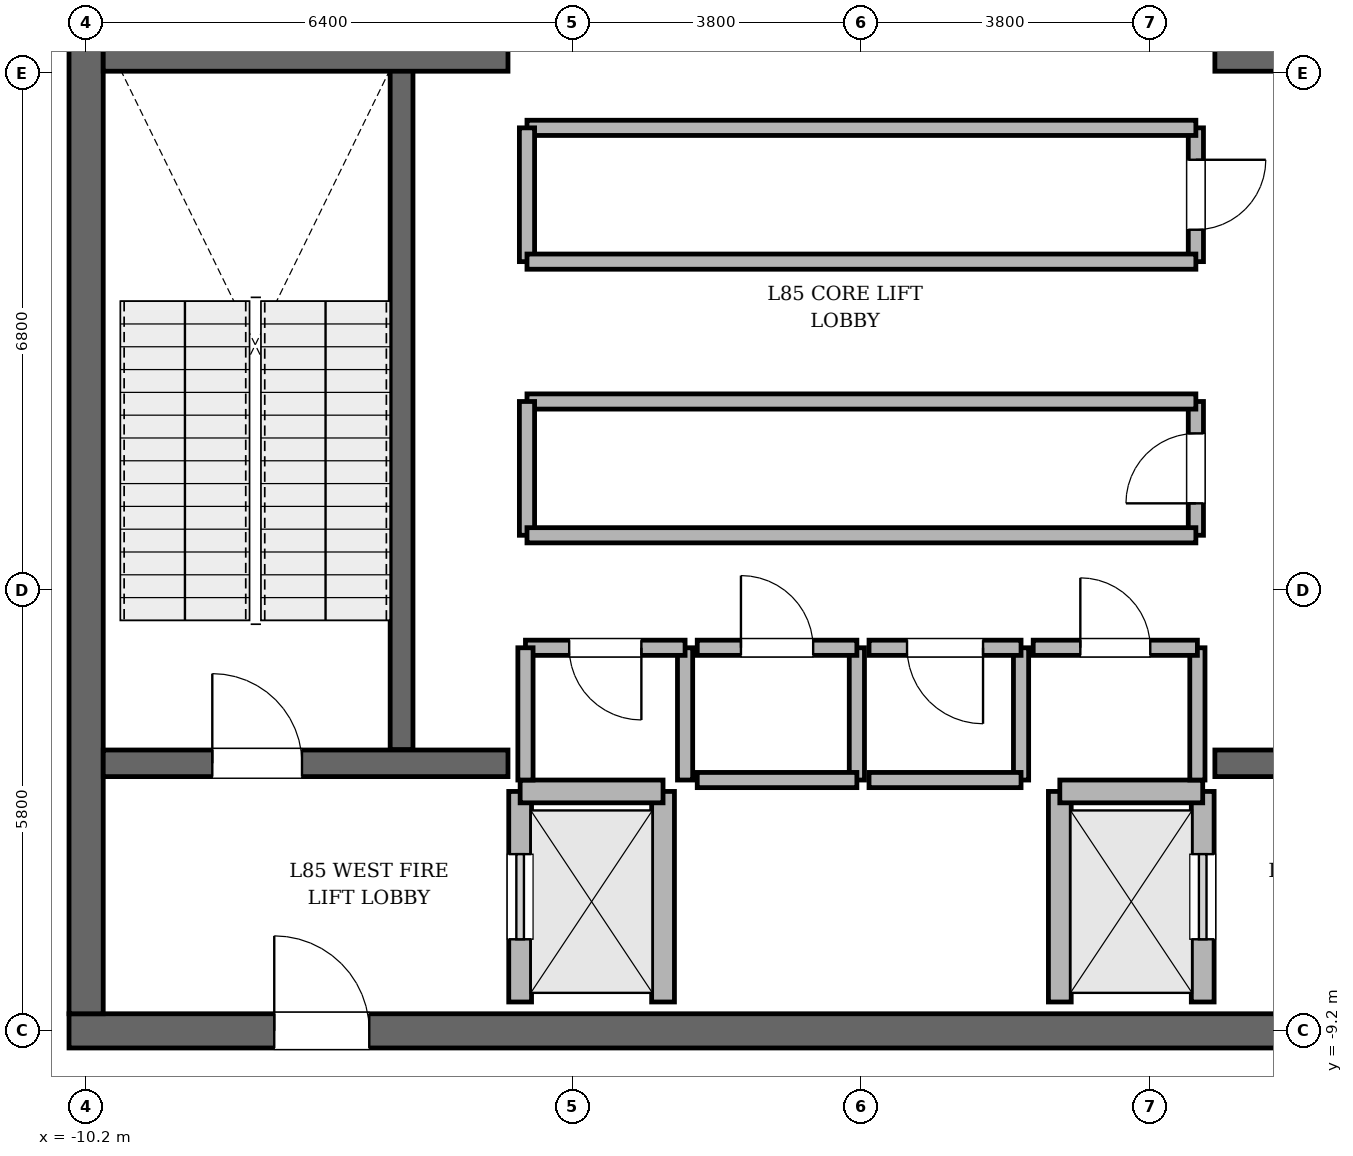
"""IFC4 building model, lengths in metres.
Left out: names, types, materials, properties, quantities, classifications, styles, units other than length and angle.
Written with IfcOpenShell. Run it as: python <this file> out.ifc"""

import sys

from ifc_helpers import new_model, si_unit, direction, frame, frame_2d, origin, place, context, subcontext, project, spatial, rectangle, extrude, element, fill, save


model = new_model("IFC4")
c1 = context("Model", 3, precision=1e-05, world=origin(), true_north=direction((0.0, 1.0)))
c2 = subcontext(c1, "Body", "Model", "MODEL_VIEW")
j1 = project(units=[si_unit("LENGTHUNIT", "METRE"), si_unit("PLANEANGLEUNIT", "RADIAN")], contexts=[c1])
p1 = place(None, origin())
s1 = spatial("IfcSite", under=j1, at=p1, CompositionType="ELEMENT")
p2 = place(p1, origin())
s2 = spatial("IfcBuilding", under=s1, at=p2, CompositionType="ELEMENT")
p3 = place(p2, frame((0.0, 0.0, 361.8)))
s3 = spatial("IfcBuildingStorey", under=s2, at=p3, CompositionType="ELEMENT", Elevation=361.8)
p4 = place(p3, frame((10.425, -9.2, 0.0), z_axis=(0.0, 0.0, 1.0), x_axis=(-1.0, 0.0, 0.0)))
e1 = element("IfcWall", 1, at=p4, inside=s3, PredefinedType="SHEAR", context=c2, shape_type="SweptSolid", body=[
    extrude(rectangle(XDim=20.85, YDim=0.45, at=frame_2d((10.425, 0.0))), origin(), (0.0, 0.0, 1.0), 4.5),
])
p5 = place(p4, frame((2.7, 0.0, 0.0)))
e2 = element("IfcOpeningElement", 2, at=p5, cuts=e1, PredefinedType="OPENING", context=c2, shape_type="SweptSolid", body=[
    extrude(rectangle(XDim=1.25, YDim=2.25, at=frame_2d((0.625, 1.125))), frame((0.0, 0.235, 0.0), z_axis=(0.0, -1.0, 0.0), x_axis=(1.0, 0.0, 0.0)), (0.0, 0.0, 1.0), 0.47),
])
p6 = place(p4, frame((16.9, 0.0, 0.0)))
e3 = element("IfcOpeningElement", 3, at=p6, cuts=e1, PredefinedType="OPENING", context=c2, shape_type="SweptSolid", body=[
    extrude(rectangle(XDim=1.25, YDim=2.25, at=frame_2d((0.625, 1.125))), frame((0.0, 0.235, 0.0), z_axis=(0.0, -1.0, 0.0), x_axis=(1.0, 0.0, 0.0)), (0.0, 0.0, 1.0), 0.47),
])
p7 = place(p3, frame((-10.2, -8.975, 0.0), z_axis=(0.0, 0.0, 1.0), x_axis=(0.0, 1.0, 0.0)))
e4 = element("IfcWall", 4, at=p7, inside=s3, PredefinedType="SHEAR", context=c2, shape_type="SweptSolid", body=[
    extrude(rectangle(XDim=17.95, YDim=0.45, at=frame_2d((8.975, 0.0))), origin(), (0.0, 0.0, 1.0), 4.5),
])
p8 = place(p7, frame((12.765, 0.0, 0.0)))
e5 = element("IfcOpeningElement", 5, at=p8, cuts=e4, PredefinedType="OPENING", context=c2, shape_type="SweptSolid", body=[
    extrude(rectangle(XDim=1.18, YDim=2.2, at=frame_2d((0.59, 1.1))), frame((0.0, 0.235, 0.0), z_axis=(0.0, -1.0, 0.0), x_axis=(1.0, 0.0, 0.0)), (0.0, 0.0, 1.0), 0.47),
])
p9 = place(p3, frame((-6.05, -5.5, 0.0), z_axis=(0.0, 0.0, 1.0), x_axis=(0.0, 1.0, 0.0)))
e6 = element("IfcWall", 6, at=p9, inside=s3, PredefinedType="SOLIDWALL", context=c2, shape_type="SweptSolid", body=[
    extrude(rectangle(XDim=8.95, YDim=0.3, at=frame_2d((4.475, 0.0))), origin(), (0.0, 0.0, 1.0), 4.5),
])
p10 = place(p3, frame((-9.975, -5.68, 0.0), z_axis=(0.0, 0.0, 1.0), x_axis=(1.0, 0.0, 0.0)))
e7 = element("IfcWall", 7, at=p10, inside=s3, PredefinedType="SOLIDWALL", context=c2, shape_type="SweptSolid", body=[
    extrude(rectangle(XDim=5.325, YDim=0.35, at=frame_2d((2.663, 0.0))), origin(), (0.0, 0.0, 1.0), 4.5),
])
p11 = place(p10, frame((1.435, 0.0, 0.0)))
e8 = element("IfcOpeningElement", 8, at=p11, cuts=e7, PredefinedType="OPENING", context=c2, shape_type="SweptSolid", body=[
    extrude(rectangle(XDim=1.18, YDim=2.2, at=frame_2d((0.59, 1.1))), frame((0.0, 0.185, 0.0), z_axis=(0.0, -1.0, 0.0), x_axis=(1.0, 0.0, 0.0)), (0.0, 0.0, 1.0), 0.37),
])
p12 = place(p3, frame((4.65, -5.68, 0.0), z_axis=(0.0, 0.0, 1.0), x_axis=(1.0, 0.0, 0.0)))
e9 = element("IfcWall", 9, at=p12, inside=s3, PredefinedType="SOLIDWALL", context=c2, shape_type="SweptSolid", body=[
    extrude(rectangle(XDim=5.325, YDim=0.35, at=frame_2d((2.663, 0.0))), origin(), (0.0, 0.0, 1.0), 4.5),
])
p13 = place(p12, frame((2.71, 0.0, 0.0)))
e10 = element("IfcOpeningElement", 10, at=p13, cuts=e9, PredefinedType="OPENING", context=c2, shape_type="SweptSolid", body=[
    extrude(rectangle(XDim=1.18, YDim=2.2, at=frame_2d((0.59, 1.1))), frame((0.0, 0.185, 0.0), z_axis=(0.0, -1.0, 0.0), x_axis=(1.0, 0.0, 0.0)), (0.0, 0.0, 1.0), 0.37),
])
for number, where, z_axis, x_axis in (
    (11, (-9.975, 3.6, 0.0), (0.0, 0.0, 1.0), (1.0, 0.0, 0.0)),
    (12, (4.65, 3.6, 0.0), (0.0, 0.0, 1.0), (1.0, 0.0, 0.0)),
):
    element("IfcWall", number, at=place(p3, frame(where, z_axis=z_axis, x_axis=x_axis)), inside=s3, PredefinedType="SOLIDWALL", context=c2, shape_type="SweptSolid", body=[
        extrude(rectangle(XDim=5.325, YDim=0.35, at=frame_2d((2.663, 0.0))), origin(), (0.0, 0.0, 1.0), 4.5),
    ])
p14 = place(p3, frame((-4.49, -8.82, 0.0), z_axis=(0.0, 0.0, 1.0), x_axis=(0.0, 1.0, 0.0)))
e13 = element("IfcWall", 13, at=p14, inside=s3, PredefinedType="SOLIDWALL", context=c2, shape_type="SweptSolid", body=[
    extrude(rectangle(XDim=2.77, YDim=0.3, at=frame_2d((1.385, 0.0))), origin(), (0.0, 0.0, 1.0), 4.28),
])
p15 = place(p14, frame((0.825, 0.0, 0.0)))
e14 = element("IfcOpeningElement", 14, at=p15, cuts=e13, PredefinedType="OPENING", context=c2, shape_type="SweptSolid", body=[
    extrude(rectangle(XDim=1.12, YDim=2.25, at=frame_2d((0.56, 1.125))), frame((0.0, 0.16, 0.0), z_axis=(0.0, -1.0, 0.0), x_axis=(1.0, 0.0, 0.0)), (0.0, 0.0, 1.0), 0.32),
])
p16 = place(p3, frame((-2.61, -8.82, 0.0), z_axis=(0.0, 0.0, 1.0), x_axis=(0.0, 1.0, 0.0)))
e15 = element("IfcWall", 15, at=p16, inside=s3, PredefinedType="SOLIDWALL", context=c2, shape_type="SweptSolid", body=[
    extrude(rectangle(XDim=2.77, YDim=0.3, at=frame_2d((1.385, 0.0))), origin(), (0.0, 0.0, 1.0), 4.28),
])
p17 = place(p3, frame((-4.49, -6.05, 0.0), z_axis=(0.0, 0.0, 1.0), x_axis=(1.0, 0.0, 0.0)))
e16 = element("IfcWall", 16, at=p17, inside=s3, PredefinedType="SOLIDWALL", context=c2, shape_type="SweptSolid", body=[
    extrude(rectangle(XDim=1.88, YDim=0.3, at=frame_2d((0.94, 0.0))), origin(), (0.0, 0.0, 1.0), 4.28),
])
p18 = place(p3, frame((4.49, -8.82, 0.0), z_axis=(0.0, 0.0, 1.0), x_axis=(0.0, 1.0, 0.0)))
e17 = element("IfcWall", 17, at=p18, inside=s3, PredefinedType="SOLIDWALL", context=c2, shape_type="SweptSolid", body=[
    extrude(rectangle(XDim=2.77, YDim=0.3, at=frame_2d((1.385, 0.0))), origin(), (0.0, 0.0, 1.0), 4.28),
])
p19 = place(p18, frame((0.825, 0.0, 0.0)))
e18 = element("IfcOpeningElement", 18, at=p19, cuts=e17, PredefinedType="OPENING", context=c2, shape_type="SweptSolid", body=[
    extrude(rectangle(XDim=1.12, YDim=2.25, at=frame_2d((0.56, 1.125))), frame((0.0, 0.16, 0.0), z_axis=(0.0, -1.0, 0.0), x_axis=(1.0, 0.0, 0.0)), (0.0, 0.0, 1.0), 0.32),
])
p20 = place(p3, frame((2.61, -8.82, 0.0), z_axis=(0.0, 0.0, 1.0), x_axis=(0.0, 1.0, 0.0)))
e19 = element("IfcWall", 19, at=p20, inside=s3, PredefinedType="SOLIDWALL", context=c2, shape_type="SweptSolid", body=[
    extrude(rectangle(XDim=2.77, YDim=0.3, at=frame_2d((1.385, 0.0))), origin(), (0.0, 0.0, 1.0), 4.28),
])
p21 = place(p3, frame((2.61, -6.05, 0.0), z_axis=(0.0, 0.0, 1.0), x_axis=(1.0, 0.0, 0.0)))
e20 = element("IfcWall", 20, at=p21, inside=s3, PredefinedType="SOLIDWALL", context=c2, shape_type="SweptSolid", body=[
    extrude(rectangle(XDim=1.88, YDim=0.3, at=frame_2d((0.94, 0.0))), origin(), (0.0, 0.0, 1.0), 4.28),
])
p22 = place(p3, frame((-2.32, -5.9, 0.0), z_axis=(0.0, 0.0, 1.0), x_axis=(0.0, 1.0, 0.0)))
e21 = element("IfcWall", 21, at=p22, inside=s3, PredefinedType="SOLIDWALL", context=c2, shape_type="SweptSolid", body=[
    extrude(rectangle(XDim=1.74, YDim=0.2, at=frame_2d((0.87, 0.0))), origin(), (0.0, 0.0, 1.0), 4.28),
])
p23 = place(p3, frame((-2.32, -4.16, 0.0), z_axis=(0.0, 0.0, 1.0), x_axis=(-1.0, 0.0, 0.0)))
e22 = element("IfcWall", 22, at=p23, inside=s3, PredefinedType="SOLIDWALL", context=c2, shape_type="SweptSolid", body=[
    extrude(rectangle(XDim=2.1, YDim=0.2, at=frame_2d((1.05, 0.0))), origin(), (0.0, 0.0, 1.0), 4.28),
])
p24 = place(p23, frame((0.575, 0.0, 0.0)))
e23 = element("IfcOpeningElement", 23, at=p24, cuts=e22, PredefinedType="OPENING", context=c2, shape_type="SweptSolid", body=[
    extrude(rectangle(XDim=0.95, YDim=2.15, at=frame_2d((0.475, 1.075))), frame((0.0, 0.11, 0.0), z_axis=(0.0, -1.0, 0.0), x_axis=(1.0, 0.0, 0.0)), (0.0, 0.0, 1.0), 0.22),
])
for number, where, z_axis, x_axis in (
    (24, (-4.42, -4.16, 0.0), (0.0, 0.0, 1.0), (0.0, -1.0, 0.0)),
    (25, (-0.06, -5.9, 0.0), (0.0, 0.0, 1.0), (0.0, 1.0, 0.0)),
):
    element("IfcWall", number, at=place(p3, frame(where, z_axis=z_axis, x_axis=x_axis)), inside=s3, PredefinedType="SOLIDWALL", context=c2, shape_type="SweptSolid", body=[
        extrude(rectangle(XDim=1.74, YDim=0.2, at=frame_2d((0.87, 0.0))), origin(), (0.0, 0.0, 1.0), 4.28),
    ])
p25 = place(p3, frame((-0.06, -4.16, 0.0), z_axis=(0.0, 0.0, 1.0), x_axis=(-1.0, 0.0, 0.0)))
e26 = element("IfcWall", 26, at=p25, inside=s3, PredefinedType="SOLIDWALL", context=c2, shape_type="SweptSolid", body=[
    extrude(rectangle(XDim=2.1, YDim=0.2, at=frame_2d((1.05, 0.0))), origin(), (0.0, 0.0, 1.0), 4.28),
])
p26 = place(p25, frame((0.575, 0.0, 0.0)))
e27 = element("IfcOpeningElement", 27, at=p26, cuts=e26, PredefinedType="OPENING", context=c2, shape_type="SweptSolid", body=[
    extrude(rectangle(XDim=0.95, YDim=2.15, at=frame_2d((0.475, 1.075))), frame((0.0, 0.11, 0.0), z_axis=(0.0, -1.0, 0.0), x_axis=(1.0, 0.0, 0.0)), (0.0, 0.0, 1.0), 0.22),
])
p27 = place(p3, frame((-2.16, -5.9, 0.0), z_axis=(0.0, 0.0, 1.0), x_axis=(1.0, 0.0, 0.0)))
e28 = element("IfcWall", 28, at=p27, inside=s3, PredefinedType="SOLIDWALL", context=c2, shape_type="SweptSolid", body=[
    extrude(rectangle(XDim=2.1, YDim=0.2, at=frame_2d((1.05, 0.0))), origin(), (0.0, 0.0, 1.0), 4.28),
])
p28 = place(p3, frame((2.1, -5.9, 0.0), z_axis=(0.0, 0.0, 1.0), x_axis=(0.0, 1.0, 0.0)))
e29 = element("IfcWall", 29, at=p28, inside=s3, PredefinedType="SOLIDWALL", context=c2, shape_type="SweptSolid", body=[
    extrude(rectangle(XDim=1.74, YDim=0.2, at=frame_2d((0.87, 0.0))), origin(), (0.0, 0.0, 1.0), 4.28),
])
p29 = place(p3, frame((2.1, -4.16, 0.0), z_axis=(0.0, 0.0, 1.0), x_axis=(-1.0, 0.0, 0.0)))
e30 = element("IfcWall", 30, at=p29, inside=s3, PredefinedType="SOLIDWALL", context=c2, shape_type="SweptSolid", body=[
    extrude(rectangle(XDim=2.0, YDim=0.2, at=frame_2d((1.0, 0.0))), origin(), (0.0, 0.0, 1.0), 4.28),
])
p30 = place(p29, frame((0.5, 0.0, 0.0)))
e31 = element("IfcOpeningElement", 31, at=p30, cuts=e30, PredefinedType="OPENING", context=c2, shape_type="SweptSolid", body=[
    extrude(rectangle(XDim=1.0, YDim=2.15, at=frame_2d((0.5, 1.075))), frame((0.0, 0.11, 0.0), z_axis=(0.0, -1.0, 0.0), x_axis=(1.0, 0.0, 0.0)), (0.0, 0.0, 1.0), 0.22),
])
p31 = place(p3, frame((0.1, -5.9, 0.0), z_axis=(0.0, 0.0, 1.0), x_axis=(1.0, 0.0, 0.0)))
e32 = element("IfcWall", 32, at=p31, inside=s3, PredefinedType="SOLIDWALL", context=c2, shape_type="SweptSolid", body=[
    extrude(rectangle(XDim=2.0, YDim=0.2, at=frame_2d((1.0, 0.0))), origin(), (0.0, 0.0, 1.0), 4.28),
])
p32 = place(p3, frame((4.42, -5.9, 0.0), z_axis=(0.0, 0.0, 1.0), x_axis=(0.0, 1.0, 0.0)))
e33 = element("IfcWall", 33, at=p32, inside=s3, PredefinedType="SOLIDWALL", context=c2, shape_type="SweptSolid", body=[
    extrude(rectangle(XDim=1.74, YDim=0.2, at=frame_2d((0.87, 0.0))), origin(), (0.0, 0.0, 1.0), 4.28),
])
p33 = place(p3, frame((4.42, -4.16, 0.0), z_axis=(0.0, 0.0, 1.0), x_axis=(-1.0, 0.0, 0.0)))
e34 = element("IfcWall", 34, at=p33, inside=s3, PredefinedType="SOLIDWALL", context=c2, shape_type="SweptSolid", body=[
    extrude(rectangle(XDim=2.16, YDim=0.2, at=frame_2d((1.08, 0.0))), origin(), (0.0, 0.0, 1.0), 4.28),
])
p34 = place(p33, frame((0.62, 0.0, 0.0)))
e35 = element("IfcOpeningElement", 35, at=p34, cuts=e34, PredefinedType="OPENING", context=c2, shape_type="SweptSolid", body=[
    extrude(rectangle(XDim=0.92, YDim=2.1, at=frame_2d((0.46, 1.05))), frame((0.0, 0.11, 0.0), z_axis=(0.0, -1.0, 0.0), x_axis=(1.0, 0.0, 0.0)), (0.0, 0.0, 1.0), 0.22),
])
p35 = place(p3, frame((4.4, -2.68, 0.0), z_axis=(0.0, 0.0, 1.0), x_axis=(0.0, 1.0, 0.0)))
e36 = element("IfcWall", 36, at=p35, inside=s3, PredefinedType="SOLIDWALL", context=c2, shape_type="SweptSolid", body=[
    extrude(rectangle(XDim=1.76, YDim=0.2, at=frame_2d((0.88, 0.0))), origin(), (0.0, 0.0, 1.0), 4.28),
])
p36 = place(p35, frame((0.42, 0.0, 0.0)))
e37 = element("IfcOpeningElement", 37, at=p36, cuts=e36, PredefinedType="OPENING", context=c2, shape_type="SweptSolid", body=[
    extrude(rectangle(XDim=0.92, YDim=2.1, at=frame_2d((0.46, 1.05))), frame((0.0, 0.11, 0.0), z_axis=(0.0, -1.0, 0.0), x_axis=(1.0, 0.0, 0.0)), (0.0, 0.0, 1.0), 0.22),
])
p37 = place(p3, frame((4.4, -0.92, 0.0), z_axis=(0.0, 0.0, 1.0), x_axis=(-1.0, 0.0, 0.0)))
e38 = element("IfcWall", 38, at=p37, inside=s3, PredefinedType="SOLIDWALL", context=c2, shape_type="SweptSolid", body=[
    extrude(rectangle(XDim=8.8, YDim=0.2, at=frame_2d((4.4, 0.0))), origin(), (0.0, 0.0, 1.0), 4.28),
])
p38 = place(p3, frame((-4.4, -0.92, 0.0), z_axis=(0.0, 0.0, 1.0), x_axis=(0.0, -1.0, 0.0)))
e39 = element("IfcWall", 39, at=p38, inside=s3, PredefinedType="SOLIDWALL", context=c2, shape_type="SweptSolid", body=[
    extrude(rectangle(XDim=1.76, YDim=0.2, at=frame_2d((0.88, 0.0))), origin(), (0.0, 0.0, 1.0), 4.28),
])
p39 = place(p3, frame((-4.4, -2.68, 0.0), z_axis=(0.0, 0.0, 1.0), x_axis=(1.0, 0.0, 0.0)))
e40 = element("IfcWall", 40, at=p39, inside=s3, PredefinedType="SOLIDWALL", context=c2, shape_type="SweptSolid", body=[
    extrude(rectangle(XDim=8.8, YDim=0.2, at=frame_2d((4.4, 0.0))), origin(), (0.0, 0.0, 1.0), 4.28),
])
p40 = place(p3, frame((4.4, 0.92, 0.0), z_axis=(0.0, 0.0, 1.0), x_axis=(0.0, 1.0, 0.0)))
e41 = element("IfcWall", 41, at=p40, inside=s3, PredefinedType="SOLIDWALL", context=c2, shape_type="SweptSolid", body=[
    extrude(rectangle(XDim=1.76, YDim=0.2, at=frame_2d((0.88, 0.0))), origin(), (0.0, 0.0, 1.0), 4.28),
])
p41 = place(p40, frame((0.42, 0.0, 0.0)))
e42 = element("IfcOpeningElement", 42, at=p41, cuts=e41, PredefinedType="OPENING", context=c2, shape_type="SweptSolid", body=[
    extrude(rectangle(XDim=0.92, YDim=2.1, at=frame_2d((0.46, 1.05))), frame((0.0, 0.11, 0.0), z_axis=(0.0, -1.0, 0.0), x_axis=(1.0, 0.0, 0.0)), (0.0, 0.0, 1.0), 0.22),
])
p42 = place(p3, frame((4.4, 2.68, 0.0), z_axis=(0.0, 0.0, 1.0), x_axis=(-1.0, 0.0, 0.0)))
e43 = element("IfcWall", 43, at=p42, inside=s3, PredefinedType="SOLIDWALL", context=c2, shape_type="SweptSolid", body=[
    extrude(rectangle(XDim=8.8, YDim=0.2, at=frame_2d((4.4, 0.0))), origin(), (0.0, 0.0, 1.0), 4.28),
])
p43 = place(p3, frame((-4.4, 2.68, 0.0), z_axis=(0.0, 0.0, 1.0), x_axis=(0.0, -1.0, 0.0)))
e44 = element("IfcWall", 44, at=p43, inside=s3, PredefinedType="SOLIDWALL", context=c2, shape_type="SweptSolid", body=[
    extrude(rectangle(XDim=1.76, YDim=0.2, at=frame_2d((0.88, 0.0))), origin(), (0.0, 0.0, 1.0), 4.28),
])
p44 = place(p3, frame((-4.4, 0.92, 0.0), z_axis=(0.0, 0.0, 1.0), x_axis=(1.0, 0.0, 0.0)))
e45 = element("IfcWall", 45, at=p44, inside=s3, PredefinedType="SOLIDWALL", context=c2, shape_type="SweptSolid", body=[
    extrude(rectangle(XDim=8.8, YDim=0.2, at=frame_2d((4.4, 0.0))), origin(), (0.0, 0.0, 1.0), 4.28),
])
p45 = place(p11, origin())
e46 = element("IfcDoor", 46, at=p45, inside=s3, OperationType="SINGLE_SWING_LEFT", PredefinedType="DOOR", context=c2, shape_type="SweptSolid", body=[
    extrude(rectangle(XDim=1.18, YDim=2.2, at=frame_2d((0.59, 1.1))), frame((0.0, 0.025, 0.0), z_axis=(0.0, -1.0, 0.0), x_axis=(1.0, 0.0, 0.0)), (0.0, 0.0, 1.0), 0.05),
])
fill(e8, e46)
p46 = place(p6, origin())
e47 = element("IfcDoor", 47, at=p46, inside=s3, OperationType="SINGLE_SWING_RIGHT", PredefinedType="DOOR", context=c2, shape_type="SweptSolid", body=[
    extrude(rectangle(XDim=1.25, YDim=2.25, at=frame_2d((0.625, 1.125))), frame((0.0, 0.025, 0.0), z_axis=(0.0, -1.0, 0.0), x_axis=(1.0, 0.0, 0.0)), (0.0, 0.0, 1.0), 0.05),
])
fill(e3, e47)
p47 = place(p15, origin())
e48 = element("IfcDoor", 48, at=p47, inside=s3, OperationType="SLIDING_TO_LEFT", PredefinedType="DOOR", context=c2, shape_type="SweptSolid", body=[
    extrude(rectangle(XDim=1.12, YDim=2.25, at=frame_2d((0.56, 1.125))), frame((0.0, 0.025, 0.0), z_axis=(0.0, -1.0, 0.0), x_axis=(1.0, 0.0, 0.0)), (0.0, 0.0, 1.0), 0.05),
])
fill(e14, e48)
p48 = place(p19, origin())
e49 = element("IfcDoor", 49, at=p48, inside=s3, OperationType="SLIDING_TO_RIGHT", PredefinedType="DOOR", context=c2, shape_type="SweptSolid", body=[
    extrude(rectangle(XDim=1.12, YDim=2.25, at=frame_2d((0.56, 1.125))), frame((0.0, 0.025, 0.0), z_axis=(0.0, -1.0, 0.0), x_axis=(1.0, 0.0, 0.0)), (0.0, 0.0, 1.0), 0.05),
])
fill(e18, e49)
p49 = place(p24, origin())
e50 = element("IfcDoor", 50, at=p49, inside=s3, OperationType="SINGLE_SWING_LEFT", PredefinedType="DOOR", context=c2, shape_type="SweptSolid", body=[
    extrude(rectangle(XDim=0.95, YDim=2.15, at=frame_2d((0.475, 1.075))), frame((0.0, 0.025, 0.0), z_axis=(0.0, -1.0, 0.0), x_axis=(1.0, 0.0, 0.0)), (0.0, 0.0, 1.0), 0.05),
])
fill(e23, e50)
p50 = place(p26, origin())
e51 = element("IfcDoor", 51, at=p50, inside=s3, OperationType="SINGLE_SWING_RIGHT", PredefinedType="DOOR", context=c2, shape_type="SweptSolid", body=[
    extrude(rectangle(XDim=0.95, YDim=2.15, at=frame_2d((0.475, 1.075))), frame((0.0, 0.025, 0.0), z_axis=(0.0, -1.0, 0.0), x_axis=(1.0, 0.0, 0.0)), (0.0, 0.0, 1.0), 0.05),
])
fill(e27, e51)
p51 = place(p30, origin())
e52 = element("IfcDoor", 52, at=p51, inside=s3, OperationType="SINGLE_SWING_LEFT", PredefinedType="DOOR", context=c2, shape_type="SweptSolid", body=[
    extrude(rectangle(XDim=1.0, YDim=2.15, at=frame_2d((0.5, 1.075))), frame((0.0, 0.025, 0.0), z_axis=(0.0, -1.0, 0.0), x_axis=(1.0, 0.0, 0.0)), (0.0, 0.0, 1.0), 0.05),
])
fill(e31, e52)
p52 = place(p34, origin())
e53 = element("IfcDoor", 53, at=p52, inside=s3, OperationType="SINGLE_SWING_RIGHT", PredefinedType="DOOR", context=c2, shape_type="SweptSolid", body=[
    extrude(rectangle(XDim=0.92, YDim=2.1, at=frame_2d((0.46, 1.05))), frame((0.0, 0.025, 0.0), z_axis=(0.0, -1.0, 0.0), x_axis=(1.0, 0.0, 0.0)), (0.0, 0.0, 1.0), 0.05),
])
fill(e35, e53)
p53 = place(p36, origin())
e54 = element("IfcDoor", 54, at=p53, inside=s3, OperationType="SINGLE_SWING_LEFT", PredefinedType="DOOR", context=c2, shape_type="SweptSolid", body=[
    extrude(rectangle(XDim=0.92, YDim=2.1, at=frame_2d((0.46, 1.05))), frame((0.0, 0.025, 0.0), z_axis=(0.0, -1.0, 0.0), x_axis=(1.0, 0.0, 0.0)), (0.0, 0.0, 1.0), 0.05),
])
fill(e37, e54)
p54 = place(p41, origin())
e55 = element("IfcDoor", 55, at=p54, inside=s3, OperationType="SINGLE_SWING_RIGHT", PredefinedType="DOOR", context=c2, shape_type="SweptSolid", body=[
    extrude(rectangle(XDim=0.92, YDim=2.1, at=frame_2d((0.46, 1.05))), frame((0.0, 0.025, 0.0), z_axis=(0.0, -1.0, 0.0), x_axis=(1.0, 0.0, 0.0)), (0.0, 0.0, 1.0), 0.05),
])
fill(e42, e55)
save(model, sys.argv[1])
